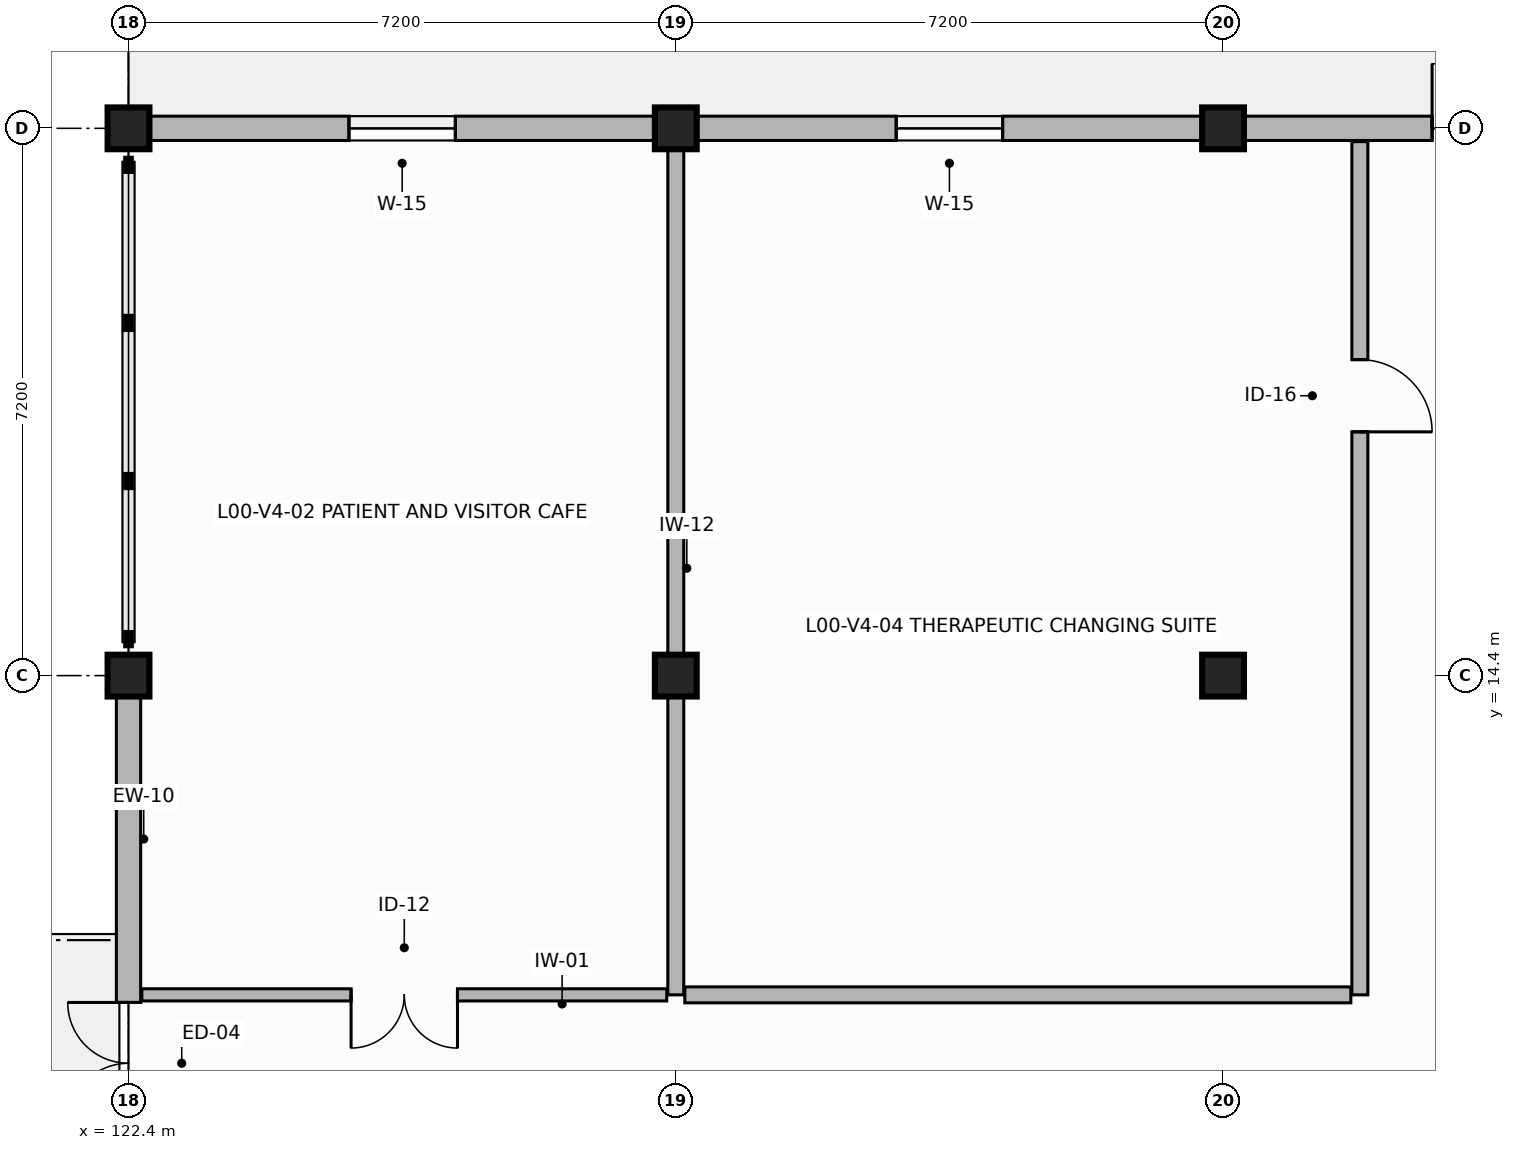
"""IFC4 building model, lengths in metres.
Left out: names, types, materials, properties, quantities, classifications, styles, units other than length and angle.
Written with IfcOpenShell. Run it as: python <this file> out.ifc"""

import sys

from ifc_helpers import new_model, si_unit, direction, frame, frame_2d, origin, origin_2d, place, context, subcontext, project, spatial, rectangle, extrude, element, fill, save


model = new_model("IFC4")
c1 = context("Model", 3, precision=1e-05, world=origin(), true_north=direction((0.0, 1.0)))
c2 = subcontext(c1, "Body", "Model", "MODEL_VIEW")
j1 = project(units=[si_unit("LENGTHUNIT", "METRE"), si_unit("PLANEANGLEUNIT", "RADIAN")], contexts=[c1])
p1 = place(None, origin())
s1 = spatial("IfcSite", under=j1, at=p1, CompositionType="ELEMENT")
p2 = place(p1, origin())
s2 = spatial("IfcBuilding", under=s1, at=p2, CompositionType="ELEMENT")
p3 = place(p2, origin())
s3 = spatial("IfcBuildingStorey", under=s2, at=p3, CompositionType="ELEMENT", Elevation=0.0)
for number, where, z_axis, x_axis in (
    (1, (122.4, 14.4, -0.35), (0.0, 0.0, 1.0), (1.0, 0.0, 0.0)),
    (2, (122.4, 21.6, -0.35), (0.0, 0.0, 1.0), (1.0, 0.0, 0.0)),
    (3, (129.6, 14.4, -0.35), (0.0, 0.0, 1.0), (1.0, 0.0, 0.0)),
    (4, (129.6, 21.6, -0.35), (0.0, 0.0, 1.0), (1.0, 0.0, 0.0)),
    (5, (136.8, 14.4, -0.35), (0.0, 0.0, 1.0), (1.0, 0.0, 0.0)),
    (6, (136.8, 21.6, -0.35), (0.0, 0.0, 1.0), (1.0, 0.0, 0.0)),
):
    element("IfcColumn", number, at=place(p3, frame(where, z_axis=z_axis, x_axis=x_axis)), inside=s3, PredefinedType="COLUMN", context=c2, shape_type="SweptSolid", body=[
        extrude(rectangle(XDim=0.55, YDim=0.55, at=origin_2d()), origin(), (0.0, 0.0, 1.0), 4.59),
    ])
p4 = place(p3, frame((144.0, 21.6, 0.0), z_axis=(0.0, 0.0, 1.0), x_axis=(-1.0, 0.0, 0.0)))
e7 = element("IfcWall", 7, at=p4, inside=s3, PredefinedType="SOLIDWALL", context=c2, shape_type="SweptSolid", body=[
    extrude(rectangle(XDim=7.2, YDim=0.32, at=frame_2d((3.6, 0.0))), origin(), (0.0, 0.0, 1.0), 3.62),
])
p5 = place(p4, frame((2.75, 0.0, 0.0)))
e8 = element("IfcOpeningElement", 8, at=p5, cuts=e7, PredefinedType="OPENING", context=c2, shape_type="SweptSolid", body=[
    extrude(rectangle(XDim=1.7, YDim=2.45, at=frame_2d((0.85, 1.225))), frame((0.0, 0.17, 0.0), z_axis=(0.0, -1.0, 0.0), x_axis=(1.0, 0.0, 0.0)), (0.0, 0.0, 1.0), 0.34),
])
p6 = place(p3, frame((136.8, 21.6, 0.0), z_axis=(0.0, 0.0, 1.0), x_axis=(-1.0, 0.0, 0.0)))
e9 = element("IfcWall", 9, at=p6, inside=s3, PredefinedType="SOLIDWALL", context=c2, shape_type="SweptSolid", body=[
    extrude(rectangle(XDim=7.2, YDim=0.32, at=frame_2d((3.6, 0.0))), origin(), (0.0, 0.0, 1.0), 3.62),
])
p7 = place(p6, frame((2.9, 0.0, 0.85)))
e10 = element("IfcOpeningElement", 10, at=p7, cuts=e9, PredefinedType="OPENING", context=c2, shape_type="SweptSolid", body=[
    extrude(rectangle(XDim=1.4, YDim=2.2, at=frame_2d((0.7, 1.1))), frame((0.0, 0.17, 0.0), z_axis=(0.0, -1.0, 0.0), x_axis=(1.0, 0.0, 0.0)), (0.0, 0.0, 1.0), 0.34),
])
p8 = place(p3, frame((129.6, 21.6, 0.0), z_axis=(0.0, 0.0, 1.0), x_axis=(-1.0, 0.0, 0.0)))
e11 = element("IfcWall", 11, at=p8, inside=s3, PredefinedType="SOLIDWALL", context=c2, shape_type="SweptSolid", body=[
    extrude(rectangle(XDim=7.2, YDim=0.32, at=frame_2d((3.6, 0.0))), origin(), (0.0, 0.0, 1.0), 3.62),
])
p9 = place(p8, frame((2.9, 0.0, 0.85)))
e12 = element("IfcOpeningElement", 12, at=p9, cuts=e11, PredefinedType="OPENING", context=c2, shape_type="SweptSolid", body=[
    extrude(rectangle(XDim=1.4, YDim=2.2, at=frame_2d((0.7, 1.1))), frame((0.0, 0.17, 0.0), z_axis=(0.0, -1.0, 0.0), x_axis=(1.0, 0.0, 0.0)), (0.0, 0.0, 1.0), 0.34),
])
p10 = place(p3, frame((122.4, 14.4, 0.0), z_axis=(0.0, 0.0, 1.0), x_axis=(0.0, -1.0, 0.0)))
e13 = element("IfcWall", 13, at=p10, inside=s3, PredefinedType="SOLIDWALL", context=c2, shape_type="SweptSolid", body=[
    extrude(rectangle(XDim=7.2, YDim=0.32, at=frame_2d((3.6, 0.0))), origin(), (0.0, 0.0, 1.0), 3.62),
])
p11 = place(p10, frame((4.3, 0.0, 0.0)))
e14 = element("IfcOpeningElement", 14, at=p11, cuts=e13, PredefinedType="OPENING", context=c2, shape_type="SweptSolid", body=[
    extrude(rectangle(XDim=1.6, YDim=2.4, at=frame_2d((0.8, 1.2))), frame((0.0, 0.17, 0.0), z_axis=(0.0, -1.0, 0.0), x_axis=(1.0, 0.0, 0.0)), (0.0, 0.0, 1.0), 0.34),
])
p12 = place(p3, frame((129.6, 21.425, 0.0), z_axis=(0.0, 0.0, 1.0), x_axis=(0.0, -1.0, 0.0)))
e15 = element("IfcWall", 15, at=p12, inside=s3, PredefinedType="PARTITIONING", context=c2, shape_type="SweptSolid", body=[
    extrude(rectangle(XDim=11.225, YDim=0.21, at=frame_2d((5.613, 0.0))), origin(), (0.0, 0.0, 1.0), 3.6),
])
p13 = place(p3, frame((129.481, 10.2, 0.0), z_axis=(0.0, 0.0, 1.0), x_axis=(-1.0, 0.0, 0.0)))
e16 = element("IfcWall", 16, at=p13, inside=s3, PredefinedType="PARTITIONING", context=c2, shape_type="SweptSolid", body=[
    extrude(rectangle(XDim=6.906, YDim=0.16, at=frame_2d((3.453, 0.0))), origin(), (0.0, 0.0, 1.0), 3.6),
])
p14 = place(p13, frame((2.753, 0.0, 0.0)))
e17 = element("IfcOpeningElement", 17, at=p14, cuts=e16, PredefinedType="OPENING", context=c2, shape_type="SweptSolid", body=[
    extrude(rectangle(XDim=1.4, YDim=2.3, at=frame_2d((0.7, 1.15))), frame((0.0, 0.09, 0.0), z_axis=(0.0, -1.0, 0.0), x_axis=(1.0, 0.0, 0.0)), (0.0, 0.0, 1.0), 0.18),
])
p15 = place(p3, frame((138.6, 21.425, 0.0), z_axis=(0.0, 0.0, 1.0), x_axis=(0.0, -1.0, 0.0)))
e18 = element("IfcWall", 18, at=p15, inside=s3, PredefinedType="PARTITIONING", context=c2, shape_type="SweptSolid", body=[
    extrude(rectangle(XDim=11.225, YDim=0.21, at=frame_2d((5.613, 0.0))), origin(), (0.0, 0.0, 1.0), 3.6),
])
p16 = place(p15, frame((2.868, 0.0, 0.0)))
e19 = element("IfcOpeningElement", 19, at=p16, cuts=e18, PredefinedType="OPENING", context=c2, shape_type="SweptSolid", body=[
    extrude(rectangle(XDim=0.95, YDim=2.15, at=frame_2d((0.475, 1.075))), frame((0.0, 0.115, 0.0), z_axis=(0.0, -1.0, 0.0), x_axis=(1.0, 0.0, 0.0)), (0.0, 0.0, 1.0), 0.23),
])
p17 = place(p3, frame((138.481, 10.2, 0.0), z_axis=(0.0, 0.0, 1.0), x_axis=(-1.0, 0.0, 0.0)))
e20 = element("IfcWall", 20, at=p17, inside=s3, PredefinedType="PARTITIONING", context=c2, shape_type="SweptSolid", body=[
    extrude(rectangle(XDim=8.762, YDim=0.21, at=frame_2d((4.381, 0.0))), origin(), (0.0, 0.0, 1.0), 3.6),
])
p18 = place(p5, frame((1.7, 0.0, 0.0), z_axis=(0.0, 0.0, 1.0), x_axis=(-1.0, 0.0, 0.0)))
e21 = element("IfcDoor", 21, at=p18, inside=s3, OperationType="DOUBLE_DOOR_SINGLE_SWING", PredefinedType="DOOR", context=c2, shape_type="SweptSolid", body=[
    extrude(rectangle(XDim=1.7, YDim=2.45, at=frame_2d((0.85, 1.225))), frame((0.0, 0.025, 0.0), z_axis=(0.0, -1.0, 0.0), x_axis=(1.0, 0.0, 0.0)), (0.0, 0.0, 1.0), 0.05),
])
fill(e8, e21)
p19 = place(p7, origin())
e22 = element("IfcWindow", 22, at=p19, inside=s3, PartitioningType="SINGLE_PANEL", PredefinedType="WINDOW", context=c2, shape_type="SweptSolid", body=[
    extrude(rectangle(XDim=1.4, YDim=2.2, at=frame_2d((0.7, 1.1))), frame((0.0, 0.03, 0.0), z_axis=(0.0, -1.0, 0.0), x_axis=(1.0, 0.0, 0.0)), (0.0, 0.0, 1.0), 0.06),
])
fill(e10, e22)
p20 = place(p9, origin())
e23 = element("IfcWindow", 23, at=p20, inside=s3, PartitioningType="SINGLE_PANEL", PredefinedType="WINDOW", context=c2, shape_type="SweptSolid", body=[
    extrude(rectangle(XDim=1.4, YDim=2.2, at=frame_2d((0.7, 1.1))), frame((0.0, 0.03, 0.0), z_axis=(0.0, -1.0, 0.0), x_axis=(1.0, 0.0, 0.0)), (0.0, 0.0, 1.0), 0.06),
])
fill(e12, e23)
p21 = place(p11, frame((1.6, 0.0, 0.0), z_axis=(0.0, 0.0, 1.0), x_axis=(-1.0, 0.0, 0.0)))
e24 = element("IfcDoor", 24, at=p21, inside=s3, OperationType="DOUBLE_DOOR_SINGLE_SWING", PredefinedType="DOOR", context=c2, shape_type="SweptSolid", body=[
    extrude(rectangle(XDim=1.6, YDim=2.4, at=frame_2d((0.8, 1.2))), frame((0.0, 0.025, 0.0), z_axis=(0.0, -1.0, 0.0), x_axis=(1.0, 0.0, 0.0)), (0.0, 0.0, 1.0), 0.05),
])
fill(e14, e24)
p22 = place(p14, origin())
e25 = element("IfcDoor", 25, at=p22, inside=s3, OperationType="DOUBLE_DOOR_SINGLE_SWING", PredefinedType="DOOR", context=c2, shape_type="SweptSolid", body=[
    extrude(rectangle(XDim=1.4, YDim=2.3, at=frame_2d((0.7, 1.15))), frame((0.0, 0.025, 0.0), z_axis=(0.0, -1.0, 0.0), x_axis=(1.0, 0.0, 0.0)), (0.0, 0.0, 1.0), 0.05),
])
fill(e17, e25)
p23 = place(p16, origin())
e26 = element("IfcDoor", 26, at=p23, inside=s3, OperationType="SINGLE_SWING_RIGHT", PredefinedType="DOOR", context=c2, shape_type="SweptSolid", body=[
    extrude(rectangle(XDim=0.95, YDim=2.15, at=frame_2d((0.475, 1.075))), frame((0.0, 0.025, 0.0), z_axis=(0.0, -1.0, 0.0), x_axis=(1.0, 0.0, 0.0)), (0.0, 0.0, 1.0), 0.05),
])
fill(e19, e26)
save(model, sys.argv[1])
